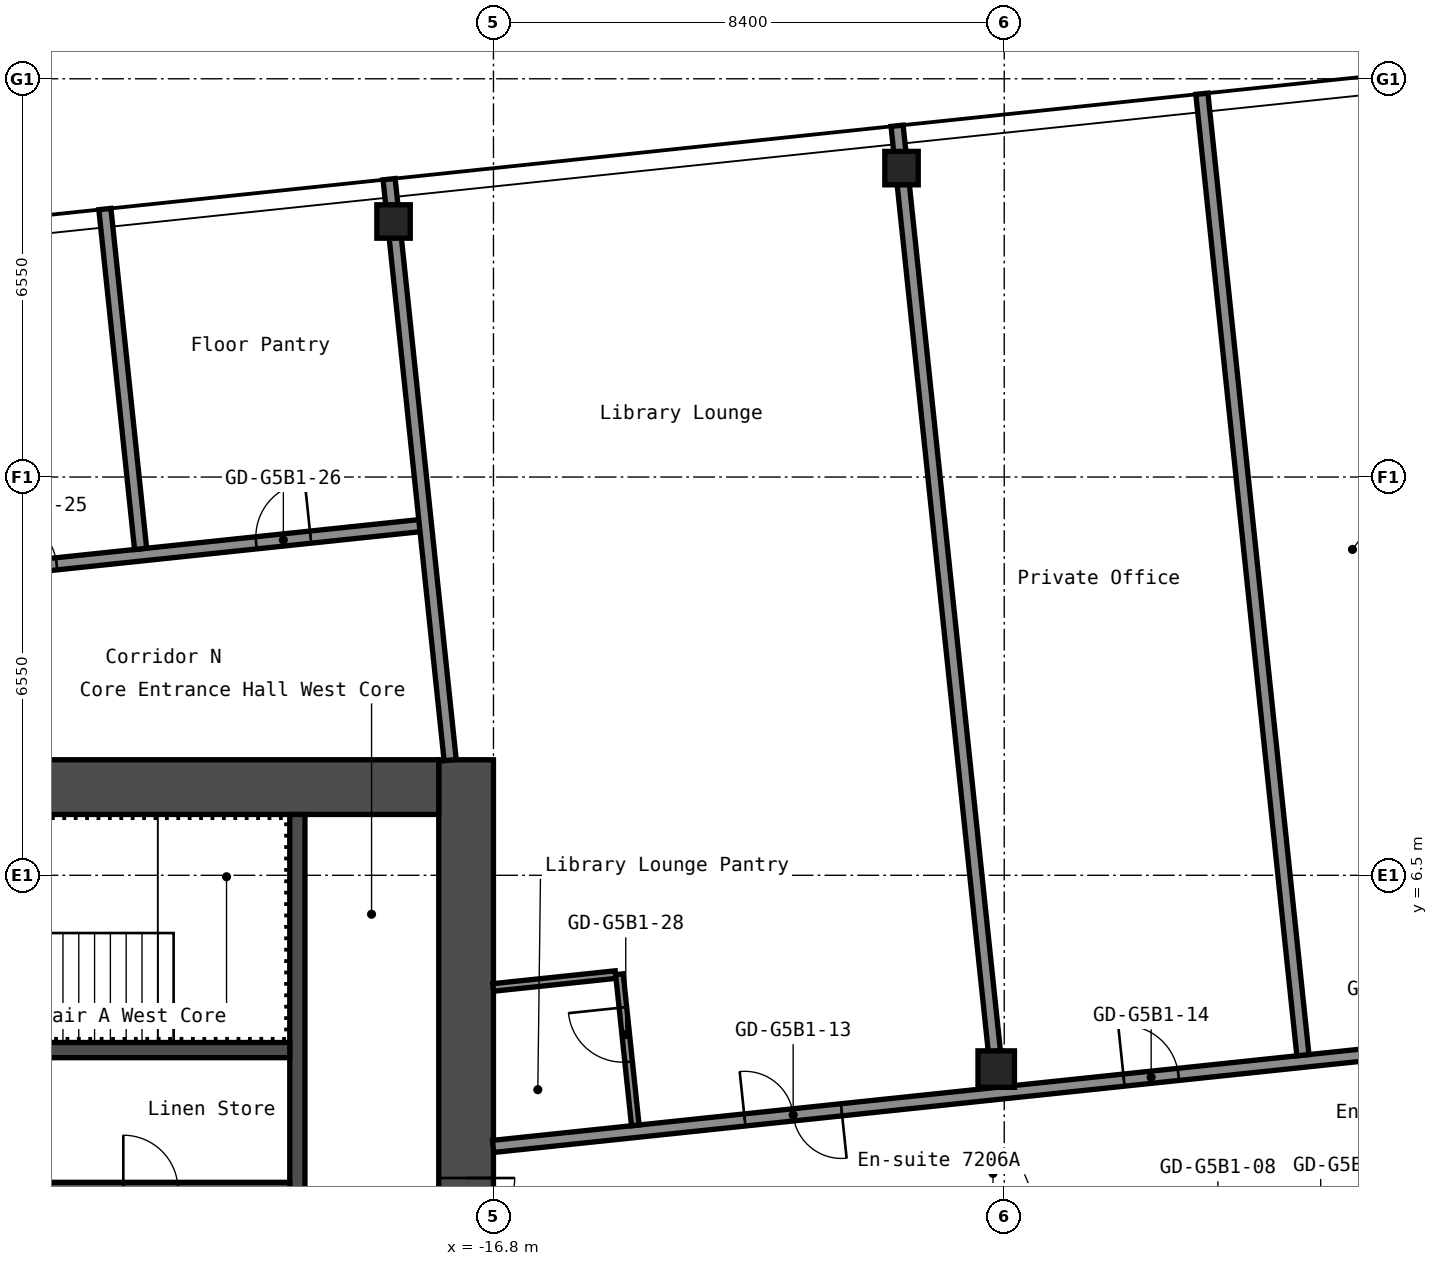
"""IFC4 building model, lengths in metres.
Left out: names, types, materials, properties, quantities, classifications, styles, units other than length and angle.
Written with IfcOpenShell. Run it as: python <this file> out.ifc"""

import sys

from ifc_helpers import new_model, si_unit, direction, frame, frame_2d, origin, origin_2d, place, context, subcontext, project, spatial, rectangle, hollow_rectangle, extrude, element, fill, save


model = new_model("IFC4")
c1 = context("Model", 3, precision=1e-05, world=origin(), true_north=direction((0.0, 1.0)))
c2 = subcontext(c1, "Body", "Model", "MODEL_VIEW")
j1 = project(units=[si_unit("LENGTHUNIT", "METRE"), si_unit("PLANEANGLEUNIT", "RADIAN")], contexts=[c1])
p1 = place(None, origin())
s1 = spatial("IfcSite", under=j1, at=p1, CompositionType="ELEMENT")
p2 = place(p1, origin())
s2 = spatial("IfcBuilding", under=s1, at=p2, CompositionType="ELEMENT")
p3 = place(p2, frame((0.0, 0.0, 255.0)))
s3 = spatial("IfcBuildingStorey", under=s2, at=p3, CompositionType="ELEMENT", Elevation=255.0)
p4 = place(p3, frame((-18.443, 17.253, 0.0), z_axis=(0.0, 0.0, 1.0), x_axis=(1.0, 0.0, 0.0)))
e1 = element("IfcColumn", 1, at=p4, inside=s3, PredefinedType="COLUMN", context=c2, shape_type="SweptSolid", body=[
    extrude(hollow_rectangle(XDim=0.55, YDim=0.55, WallThickness=0.022, InnerFilletRadius=0.033, OuterFilletRadius=0.055, at=origin_2d()), origin(), (0.0, 0.0, 1.0), 2.75),
])
p5 = place(p3, frame((-8.532, 3.312, 0.0), z_axis=(0.0, 0.0, 1.0), x_axis=(1.0, 0.0, 0.0)))
e2 = element("IfcColumn", 2, at=p5, inside=s3, PredefinedType="COLUMN", context=c2, shape_type="SweptSolid", body=[
    extrude(hollow_rectangle(XDim=0.6, YDim=0.6, WallThickness=0.025, InnerFilletRadius=0.038, OuterFilletRadius=0.062, at=origin_2d()), origin(), (0.0, 0.0, 1.0), 2.75),
])
p6 = place(p3, frame((-10.089, 18.131, 0.0), z_axis=(0.0, 0.0, 1.0), x_axis=(1.0, 0.0, 0.0)))
e3 = element("IfcColumn", 3, at=p6, inside=s3, PredefinedType="COLUMN", context=c2, shape_type="SweptSolid", body=[
    extrude(hollow_rectangle(XDim=0.55, YDim=0.55, WallThickness=0.022, InnerFilletRadius=0.033, OuterFilletRadius=0.055, at=origin_2d()), origin(), (0.0, 0.0, 1.0), 2.75),
])
p7 = place(p3, frame((-17.25, -8.4, 0.0), z_axis=(0.0, 0.0, 1.0), x_axis=(0.0, 1.0, 0.0)))
e4 = element("IfcWall", 4, at=p7, inside=s3, PredefinedType="SHEAR", context=c2, shape_type="SweptSolid", body=[
    extrude(rectangle(XDim=16.8, YDim=0.9, at=frame_2d((8.4, 0.0))), origin(), (0.0, 0.0, 1.0), 2.75),
])
p8 = place(p7, frame((8.321, 0.0, 0.0)))
e5 = element("IfcOpeningElement", 5, at=p8, cuts=e4, PredefinedType="OPENING", context=c2, shape_type="SweptSolid", body=[
    extrude(rectangle(XDim=1.6, YDim=2.1, at=frame_2d((0.8, 1.05))), frame((0.0, 0.46, 0.0), z_axis=(0.0, -1.0, 0.0), x_axis=(1.0, 0.0, 0.0)), (0.0, 0.0, 1.0), 0.92),
])
p9 = place(p3, frame((-32.7, 7.95, 0.0), z_axis=(0.0, 0.0, 1.0), x_axis=(1.0, 0.0, 0.0)))
e6 = element("IfcWall", 6, at=p9, inside=s3, PredefinedType="SHEAR", context=c2, shape_type="SweptSolid", body=[
    extrude(rectangle(XDim=15.0, YDim=0.9, at=frame_2d((7.5, 0.0))), origin(), (0.0, 0.0, 1.0), 2.75),
])
p10 = place(p9, frame((3.4, 0.0, 0.0)))
e7 = element("IfcOpeningElement", 7, at=p10, cuts=e6, PredefinedType="OPENING", context=c2, shape_type="SweptSolid", body=[
    extrude(rectangle(XDim=1.2, YDim=2.1, at=frame_2d((0.6, 1.05))), frame((0.0, 0.46, 0.0), z_axis=(0.0, -1.0, 0.0), x_axis=(1.0, 0.0, 0.0)), (0.0, 0.0, 1.0), 0.92),
])
p11 = place(p9, frame((0.75, 0.0, 0.0)))
e8 = element("IfcOpeningElement", 8, at=p11, cuts=e6, PredefinedType="OPENING", context=c2, shape_type="SweptSolid", body=[
    extrude(rectangle(XDim=0.9, YDim=2.1, at=frame_2d((0.45, 1.05))), frame((0.0, 0.46, 0.0), z_axis=(0.0, -1.0, 0.0), x_axis=(1.0, 0.0, 0.0)), (0.0, 0.0, 1.0), 0.92),
])
p12 = place(p3, frame((-20.025, 1.2, 0.0), z_axis=(0.0, 0.0, 1.0), x_axis=(0.0, 1.0, 0.0)))
e9 = element("IfcWall", 9, at=p12, inside=s3, PredefinedType="SHEAR", context=c2, shape_type="SweptSolid", body=[
    extrude(rectangle(XDim=6.3, YDim=0.25, at=frame_2d((3.15, 0.0))), origin(), (0.0, 0.0, 1.0), 2.75),
])
p13 = place(p3, frame((-27.65, 1.325, 0.0), z_axis=(0.0, 0.0, 1.0), x_axis=(1.0, 0.0, 0.0)))
e10 = element("IfcWall", 10, at=p13, inside=s3, PredefinedType="SHEAR", context=c2, shape_type="SweptSolid", body=[
    extrude(rectangle(XDim=7.5, YDim=0.25, at=frame_2d((3.75, 0.0))), origin(), (0.0, 0.0, 1.0), 2.75),
])
p14 = place(p13, frame((4.762, 0.0, 0.0)))
e11 = element("IfcOpeningElement", 11, at=p14, cuts=e10, PredefinedType="OPENING", context=c2, shape_type="SweptSolid", body=[
    extrude(rectangle(XDim=0.9, YDim=2.1, at=frame_2d((0.45, 1.05))), frame((0.0, 0.135, 0.0), z_axis=(0.0, -1.0, 0.0), x_axis=(1.0, 0.0, 0.0)), (0.0, 0.0, 1.0), 0.27),
])
p15 = place(p13, frame((1.062, 0.0, 0.0)))
e12 = element("IfcOpeningElement", 12, at=p15, cuts=e10, PredefinedType="OPENING", context=c2, shape_type="SweptSolid", body=[
    extrude(rectangle(XDim=0.9, YDim=2.1, at=frame_2d((0.45, 1.05))), frame((0.0, 0.135, 0.0), z_axis=(0.0, -1.0, 0.0), x_axis=(1.0, 0.0, 0.0)), (0.0, 0.0, 1.0), 0.27),
])
p16 = place(p3, frame((-27.65, 3.625, 0.0), z_axis=(0.0, 0.0, 1.0), x_axis=(1.0, 0.0, 0.0)))
e13 = element("IfcWall", 13, at=p16, inside=s3, PredefinedType="SHEAR", context=c2, shape_type="SweptSolid", body=[
    extrude(rectangle(XDim=7.5, YDim=0.25, at=frame_2d((3.75, 0.0))), origin(), (0.0, 0.0, 1.0), 2.75),
])
p17 = place(p3, frame((-16.572, -0.549, 0.0), z_axis=(0.0, 0.0, 1.0), x_axis=(0.994521146831, 0.104535584879, 0.0)))
e14 = element("IfcWall", 14, at=p17, inside=s3, PredefinedType="PARTITIONING", context=c2, shape_type="SweptSolid", body=[
    extrude(rectangle(XDim=33.561, YDim=0.2, at=frame_2d((16.78, 0.0))), origin(), (0.0, 0.0, 1.0), 2.75),
])
p18 = place(p17, frame((1.315, 0.0, 0.0)))
e15 = element("IfcOpeningElement", 15, at=p18, cuts=e14, PredefinedType="OPENING", context=c2, shape_type="SweptSolid", body=[
    extrude(rectangle(XDim=0.9, YDim=2.1, at=frame_2d((0.45, 1.05))), frame((0.0, 0.11, 0.0), z_axis=(0.0, -1.0, 0.0), x_axis=(1.0, 0.0, 0.0)), (0.0, 0.0, 1.0), 0.22),
])
p19 = place(p17, frame((5.515, 0.0, 0.0)))
e16 = element("IfcOpeningElement", 16, at=p19, cuts=e14, PredefinedType="OPENING", context=c2, shape_type="SweptSolid", body=[
    extrude(rectangle(XDim=0.9, YDim=2.1, at=frame_2d((0.45, 1.05))), frame((0.0, 0.11, 0.0), z_axis=(0.0, -1.0, 0.0), x_axis=(1.0, 0.0, 0.0)), (0.0, 0.0, 1.0), 0.22),
])
p20 = place(p17, frame((11.25, 0.0, 0.0)))
e17 = element("IfcOpeningElement", 17, at=p20, cuts=e14, PredefinedType="OPENING", context=c2, shape_type="SweptSolid", body=[
    extrude(rectangle(XDim=1.0, YDim=2.1, at=frame_2d((0.5, 1.05))), frame((0.0, 0.11, 0.0), z_axis=(0.0, -1.0, 0.0), x_axis=(1.0, 0.0, 0.0)), (0.0, 0.0, 1.0), 0.22),
])
p21 = place(p17, frame((12.95, 0.0, 0.0)))
e18 = element("IfcOpeningElement", 18, at=p21, cuts=e14, PredefinedType="OPENING", context=c2, shape_type="SweptSolid", body=[
    extrude(rectangle(XDim=1.0, YDim=2.1, at=frame_2d((0.5, 1.05))), frame((0.0, 0.11, 0.0), z_axis=(0.0, -1.0, 0.0), x_axis=(1.0, 0.0, 0.0)), (0.0, 0.0, 1.0), 0.22),
])
p22 = place(p17, frame((18.03, 0.0, 0.0)))
e19 = element("IfcOpeningElement", 19, at=p22, cuts=e14, PredefinedType="OPENING", context=c2, shape_type="SweptSolid", body=[
    extrude(rectangle(XDim=0.9, YDim=2.1, at=frame_2d((0.45, 1.05))), frame((0.0, 0.11, 0.0), z_axis=(0.0, -1.0, 0.0), x_axis=(1.0, 0.0, 0.0)), (0.0, 0.0, 1.0), 0.22),
])
p23 = place(p17, frame((22.23, 0.0, 0.0)))
e20 = element("IfcOpeningElement", 20, at=p23, cuts=e14, PredefinedType="OPENING", context=c2, shape_type="SweptSolid", body=[
    extrude(rectangle(XDim=0.9, YDim=2.1, at=frame_2d((0.45, 1.05))), frame((0.0, 0.11, 0.0), z_axis=(0.0, -1.0, 0.0), x_axis=(1.0, 0.0, 0.0)), (0.0, 0.0, 1.0), 0.22),
])
p24 = place(p17, frame((28.9, 0.0, 0.0)))
e21 = element("IfcOpeningElement", 21, at=p24, cuts=e14, PredefinedType="OPENING", context=c2, shape_type="SweptSolid", body=[
    extrude(rectangle(XDim=1.0, YDim=2.1, at=frame_2d((0.5, 1.05))), frame((0.0, 0.11, 0.0), z_axis=(0.0, -1.0, 0.0), x_axis=(1.0, 0.0, 0.0)), (0.0, 0.0, 1.0), 0.22),
])
p25 = place(p3, frame((-16.805, 2.041, 0.0), z_axis=(0.0, 0.0, 1.0), x_axis=(0.994521146831, 0.104535584879, 0.0)))
e22 = element("IfcWall", 22, at=p25, inside=s3, PredefinedType="PARTITIONING", context=c2, shape_type="SweptSolid", body=[
    extrude(rectangle(XDim=33.561, YDim=0.2, at=frame_2d((16.78, 0.0))), origin(), (0.0, 0.0, 1.0), 2.75),
])
p26 = place(p25, frame((4.161, 0.0, 0.0)))
e23 = element("IfcOpeningElement", 23, at=p26, cuts=e22, PredefinedType="OPENING", context=c2, shape_type="SweptSolid", body=[
    extrude(rectangle(XDim=1.6, YDim=2.1, at=frame_2d((0.8, 1.05))), frame((0.0, 0.11, 0.0), z_axis=(0.0, -1.0, 0.0), x_axis=(1.0, 0.0, 0.0)), (0.0, 0.0, 1.0), 0.22),
])
p27 = place(p25, frame((10.431, 0.0, 0.0)))
e24 = element("IfcOpeningElement", 24, at=p27, cuts=e22, PredefinedType="OPENING", context=c2, shape_type="SweptSolid", body=[
    extrude(rectangle(XDim=0.9, YDim=2.1, at=frame_2d((0.45, 1.05))), frame((0.0, 0.11, 0.0), z_axis=(0.0, -1.0, 0.0), x_axis=(1.0, 0.0, 0.0)), (0.0, 0.0, 1.0), 0.22),
])
p28 = place(p25, frame((14.631, 0.0, 0.0)))
e25 = element("IfcOpeningElement", 25, at=p28, cuts=e22, PredefinedType="OPENING", context=c2, shape_type="SweptSolid", body=[
    extrude(rectangle(XDim=0.9, YDim=2.1, at=frame_2d((0.45, 1.05))), frame((0.0, 0.11, 0.0), z_axis=(0.0, -1.0, 0.0), x_axis=(1.0, 0.0, 0.0)), (0.0, 0.0, 1.0), 0.22),
])
p29 = place(p25, frame((19.611, 0.0, 0.0)))
e26 = element("IfcOpeningElement", 26, at=p29, cuts=e22, PredefinedType="OPENING", context=c2, shape_type="SweptSolid", body=[
    extrude(rectangle(XDim=1.0, YDim=2.1, at=frame_2d((0.5, 1.05))), frame((0.0, 0.11, 0.0), z_axis=(0.0, -1.0, 0.0), x_axis=(1.0, 0.0, 0.0)), (0.0, 0.0, 1.0), 0.22),
])
p30 = place(p25, frame((21.311, 0.0, 0.0)))
e27 = element("IfcOpeningElement", 27, at=p30, cuts=e22, PredefinedType="OPENING", context=c2, shape_type="SweptSolid", body=[
    extrude(rectangle(XDim=1.0, YDim=2.1, at=frame_2d((0.5, 1.05))), frame((0.0, 0.11, 0.0), z_axis=(0.0, -1.0, 0.0), x_axis=(1.0, 0.0, 0.0)), (0.0, 0.0, 1.0), 0.22),
])
p31 = place(p25, frame((26.221, 0.0, 0.0)))
e28 = element("IfcOpeningElement", 28, at=p31, cuts=e22, PredefinedType="OPENING", context=c2, shape_type="SweptSolid", body=[
    extrude(rectangle(XDim=0.9, YDim=2.1, at=frame_2d((0.45, 1.05))), frame((0.0, 0.11, 0.0), z_axis=(0.0, -1.0, 0.0), x_axis=(1.0, 0.0, 0.0)), (0.0, 0.0, 1.0), 0.22),
])
p32 = place(p25, frame((30.421, 0.0, 0.0)))
e29 = element("IfcOpeningElement", 29, at=p32, cuts=e22, PredefinedType="OPENING", context=c2, shape_type="SweptSolid", body=[
    extrude(rectangle(XDim=0.9, YDim=2.1, at=frame_2d((0.45, 1.05))), frame((0.0, 0.11, 0.0), z_axis=(0.0, -1.0, 0.0), x_axis=(1.0, 0.0, 0.0)), (0.0, 0.0, 1.0), 0.22),
])
p33 = place(p3, frame((-16.805, 4.655, 0.0), z_axis=(0.0, 0.0, 1.0), x_axis=(0.994521955988, 0.104527886512, 0.0)))
e30 = element("IfcWall", 30, at=p33, inside=s3, PredefinedType="PARTITIONING", context=c2, shape_type="SweptSolid", body=[
    extrude(rectangle(XDim=2.025, YDim=0.125, at=frame_2d((1.012, 0.0))), origin(), (0.0, 0.0, 1.0), 2.75),
])
p34 = place(p3, frame((-39.102, 10.034, 0.0), z_axis=(0.0, 0.0, 1.0), x_axis=(0.994522585465, 0.104521897229, 0.0)))
e31 = element("IfcWall", 31, at=p34, inside=s3, PredefinedType="PARTITIONING", context=c2, shape_type="SweptSolid", body=[
    extrude(rectangle(XDim=21.3, YDim=0.2, at=frame_2d((10.65, 0.0))), origin(), (0.0, 0.0, 1.0), 2.75),
])
p35 = place(p34, frame((1.95, 0.0, 0.0)))
e32 = element("IfcOpeningElement", 32, at=p35, cuts=e31, PredefinedType="OPENING", context=c2, shape_type="SweptSolid", body=[
    extrude(rectangle(XDim=0.9, YDim=2.1, at=frame_2d((0.45, 1.05))), frame((0.0, 0.11, 0.0), z_axis=(0.0, -1.0, 0.0), x_axis=(1.0, 0.0, 0.0)), (0.0, 0.0, 1.0), 0.22),
])
p36 = place(p34, frame((8.2, 0.0, 0.0)))
e33 = element("IfcOpeningElement", 33, at=p36, cuts=e31, PredefinedType="OPENING", context=c2, shape_type="SweptSolid", body=[
    extrude(rectangle(XDim=1.0, YDim=2.1, at=frame_2d((0.5, 1.05))), frame((0.0, 0.11, 0.0), z_axis=(0.0, -1.0, 0.0), x_axis=(1.0, 0.0, 0.0)), (0.0, 0.0, 1.0), 0.22),
])
p37 = place(p34, frame((14.3, 0.0, 0.0)))
e34 = element("IfcOpeningElement", 34, at=p37, cuts=e31, PredefinedType="OPENING", context=c2, shape_type="SweptSolid", body=[
    extrude(rectangle(XDim=0.9, YDim=2.1, at=frame_2d((0.45, 1.05))), frame((0.0, 0.11, 0.0), z_axis=(0.0, -1.0, 0.0), x_axis=(1.0, 0.0, 0.0)), (0.0, 0.0, 1.0), 0.22),
])
p38 = place(p34, frame((18.5, 0.0, 0.0)))
e35 = element("IfcOpeningElement", 35, at=p38, cuts=e31, PredefinedType="OPENING", context=c2, shape_type="SweptSolid", body=[
    extrude(rectangle(XDim=0.9, YDim=2.1, at=frame_2d((0.45, 1.05))), frame((0.0, 0.11, 0.0), z_axis=(0.0, -1.0, 0.0), x_axis=(1.0, 0.0, 0.0)), (0.0, 0.0, 1.0), 0.22),
])
p39 = place(p3, frame((-22.603, 11.868, 0.0), z_axis=(0.0, 0.0, 1.0), x_axis=(-0.104560413987, 0.994518536693, 0.0)))
e36 = element("IfcWall", 36, at=p39, inside=s3, PredefinedType="PARTITIONING", context=c2, shape_type="SweptSolid", body=[
    extrude(rectangle(XDim=5.62, YDim=0.2, at=frame_2d((2.81, 0.0))), origin(), (0.0, 0.0, 1.0), 2.75),
])
p40 = place(p3, frame((-17.512, 8.395, 0.0), z_axis=(0.0, 0.0, 1.0), x_axis=(-0.104524714473, 0.994522289375, 0.0)))
e37 = element("IfcWall", 37, at=p40, inside=s3, PredefinedType="PARTITIONING", context=c2, shape_type="SweptSolid", body=[
    extrude(rectangle(XDim=9.607, YDim=0.2, at=frame_2d((4.803, 0.0))), origin(), (0.0, 0.0, 1.0), 2.75),
])
p41 = place(p3, frame((-14.468, 2.387, 0.0), z_axis=(0.0, 0.0, 1.0), x_axis=(-0.104491611519, 0.994525767953, 0.0)))
e38 = element("IfcWall", 38, at=p41, inside=s3, PredefinedType="PARTITIONING", context=c2, shape_type="SweptSolid", body=[
    extrude(rectangle(XDim=2.5, YDim=0.125, at=frame_2d((1.25, 0.0))), origin(), (0.0, 0.0, 1.0), 2.75),
])
p42 = place(p41, frame((1.05, 0.0, 0.0)))
e39 = element("IfcOpeningElement", 39, at=p42, cuts=e38, PredefinedType="OPENING", context=c2, shape_type="SweptSolid", body=[
    extrude(rectangle(XDim=0.9, YDim=2.1, at=frame_2d((0.45, 1.05))), frame((0.0, 0.073, 0.0), z_axis=(0.0, -1.0, 0.0), x_axis=(1.0, 0.0, 0.0)), (0.0, 0.0, 1.0), 0.145),
])
p43 = place(p3, frame((-8.562, 3.603, 0.0), z_axis=(0.0, 0.0, 1.0), x_axis=(-0.104523729364, 0.99452239291, 0.0)))
e40 = element("IfcWall", 40, at=p43, inside=s3, PredefinedType="PARTITIONING", context=c2, shape_type="SweptSolid", body=[
    extrude(rectangle(XDim=15.308, YDim=0.2, at=frame_2d((7.654, 0.0))), origin(), (0.0, 0.0, 1.0), 2.75),
])
p44 = place(p3, frame((-3.488, 3.541, 0.0), z_axis=(0.0, 0.0, 1.0), x_axis=(-0.104519331095, 0.994522855156, 0.0)))
e41 = element("IfcWall", 41, at=p44, inside=s3, PredefinedType="PARTITIONING", context=c2, shape_type="SweptSolid", body=[
    extrude(rectangle(XDim=15.9, YDim=0.2, at=frame_2d((7.95, 0.0))), origin(), (0.0, 0.0, 1.0), 2.75),
])
p45 = place(p8, origin())
e42 = element("IfcDoor", 42, at=p45, inside=s3, OperationType="DOUBLE_DOOR_SINGLE_SWING", PredefinedType="DOOR", context=c2, shape_type="SweptSolid", body=[
    extrude(rectangle(XDim=1.6, YDim=2.1, at=frame_2d((0.8, 1.05))), frame((0.0, 0.025, 0.0), z_axis=(0.0, -1.0, 0.0), x_axis=(1.0, 0.0, 0.0)), (0.0, 0.0, 1.0), 0.05),
])
fill(e5, e42)
p46 = place(p26, origin())
e43 = element("IfcDoor", 43, at=p46, inside=s3, OperationType="DOUBLE_DOOR_SINGLE_SWING", PredefinedType="DOOR", context=c2, shape_type="SweptSolid", body=[
    extrude(rectangle(XDim=1.6, YDim=2.1, at=frame_2d((0.8, 1.05))), frame((0.0, 0.025, 0.0), z_axis=(0.0, -1.0, 0.0), x_axis=(1.0, 0.0, 0.0)), (0.0, 0.0, 1.0), 0.05),
])
fill(e23, e43)
p47 = place(p27, origin())
e44 = element("IfcDoor", 44, at=p47, inside=s3, OperationType="SINGLE_SWING_RIGHT", PredefinedType="DOOR", context=c2, shape_type="SweptSolid", body=[
    extrude(rectangle(XDim=0.9, YDim=2.1, at=frame_2d((0.45, 1.05))), frame((0.0, 0.025, 0.0), z_axis=(0.0, -1.0, 0.0), x_axis=(1.0, 0.0, 0.0)), (0.0, 0.0, 1.0), 0.05),
])
fill(e24, e44)
p48 = place(p37, origin())
e45 = element("IfcDoor", 45, at=p48, inside=s3, OperationType="SINGLE_SWING_RIGHT", PredefinedType="DOOR", context=c2, shape_type="SweptSolid", body=[
    extrude(rectangle(XDim=0.9, YDim=2.1, at=frame_2d((0.45, 1.05))), frame((0.0, 0.025, 0.0), z_axis=(0.0, -1.0, 0.0), x_axis=(1.0, 0.0, 0.0)), (0.0, 0.0, 1.0), 0.05),
])
fill(e34, e45)
p49 = place(p38, origin())
e46 = element("IfcDoor", 46, at=p49, inside=s3, OperationType="SINGLE_SWING_LEFT", PredefinedType="DOOR", context=c2, shape_type="SweptSolid", body=[
    extrude(rectangle(XDim=0.9, YDim=2.1, at=frame_2d((0.45, 1.05))), frame((0.0, 0.025, 0.0), z_axis=(0.0, -1.0, 0.0), x_axis=(1.0, 0.0, 0.0)), (0.0, 0.0, 1.0), 0.05),
])
fill(e35, e46)
p50 = place(p42, origin())
e47 = element("IfcDoor", 47, at=p50, inside=s3, OperationType="SINGLE_SWING_LEFT", PredefinedType="DOOR", context=c2, shape_type="SweptSolid", body=[
    extrude(rectangle(XDim=0.9, YDim=2.1, at=frame_2d((0.45, 1.05))), frame((0.0, 0.025, 0.0), z_axis=(0.0, -1.0, 0.0), x_axis=(1.0, 0.0, 0.0)), (0.0, 0.0, 1.0), 0.05),
])
fill(e39, e47)
save(model, sys.argv[1])
